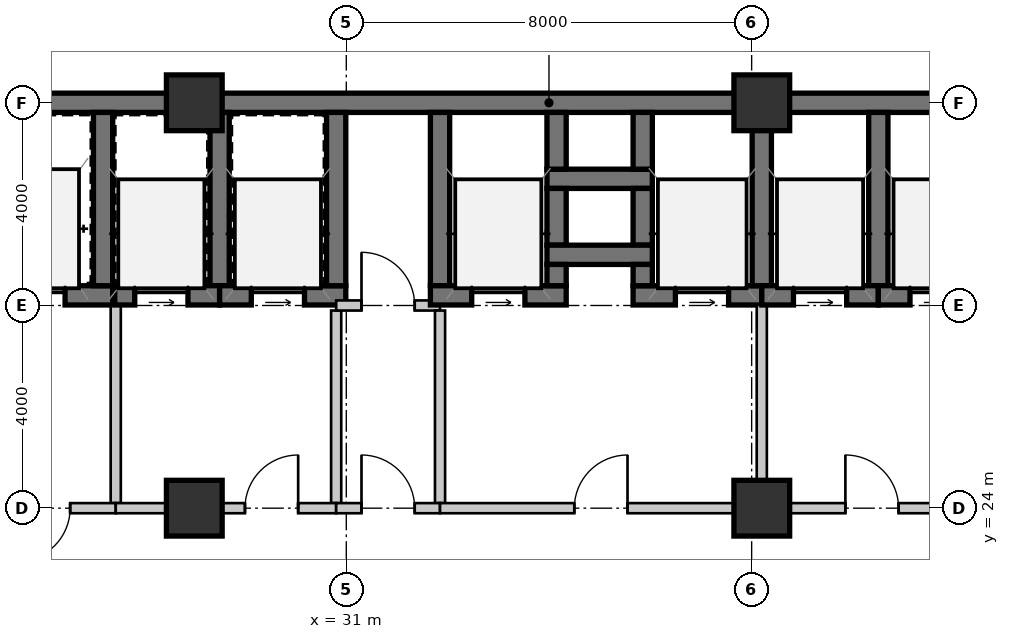
"""IFC4 building model, lengths in metres.
Left out: names, types, materials, properties, quantities, classifications, styles, units other than length and angle.
Written with IfcOpenShell. Run it as: python <this file> out.ifc"""

import sys

from ifc_helpers import new_model, si_unit, direction, frame, frame_2d, origin, origin_2d, place, context, subcontext, project, spatial, rectangle, extrude, source, transform, mapped, element, fill, save


model = new_model("IFC4")
c1 = context("Model", 3, precision=1e-05, world=origin(), true_north=direction((0.0, 1.0)))
c2 = subcontext(c1, "Body", "Model", "MODEL_VIEW")
j1 = project(units=[si_unit("LENGTHUNIT", "METRE"), si_unit("PLANEANGLEUNIT", "RADIAN")], contexts=[c1])
p1 = place(None, origin())
s1 = spatial("IfcSite", under=j1, at=p1, CompositionType="ELEMENT")
p2 = place(p1, origin())
s2 = spatial("IfcBuilding", under=s1, at=p2, CompositionType="ELEMENT")
p3 = place(p2, origin())
s3 = spatial("IfcBuildingStorey", under=s2, at=p3, CompositionType="ELEMENT", Elevation=0.0)
m1 = source(origin(), c2, "Body", "SweptSolid", [
    extrude(rectangle(XDim=1.1, YDim=1.1, at=origin_2d()), origin(), (0.0, 0.0, 1.0), 4.55),
])
for number, where, z_axis, x_axis in (
    (1, (28.0, 24.0, 0.0), (0.0, 0.0, 1.0), (1.0, 0.0, 0.0)),
    (2, (39.2, 24.0, 0.0), (0.0, 0.0, 1.0), (1.0, 0.0, 0.0)),
    (3, (28.0, 32.0, 0.0), (0.0, 0.0, 1.0), (1.0, 0.0, 0.0)),
    (4, (39.2, 32.0, 0.0), (0.0, 0.0, 1.0), (1.0, 0.0, 0.0)),
):
    element("IfcColumn", number, at=place(p3, frame(where, z_axis=z_axis, x_axis=x_axis)), inside=s3, PredefinedType="COLUMN", context=c2, shape_type="MappedRepresentation", body=[
        mapped(m1, transform((0.0, 0.0, 0.0), scale=1.0)),
    ])
m2 = source(origin(), c2, "Body", "SweptSolid", [
    extrude(rectangle(XDim=9.19, YDim=0.38, at=frame_2d((4.595, 0.0))), origin(), (0.0, 0.0, 1.0), 4.29),
])
p4 = place(p3, frame((18.81, 32.0, 0.0), z_axis=(0.0, 0.0, 1.0), x_axis=(1.0, 0.0, 0.0)))
e5 = element("IfcWall", 5, at=p4, inside=s3, PredefinedType="SHEAR", context=c2, shape_type="MappedRepresentation", body=[
    mapped(m2, transform((0.0, 0.0, 0.0), scale=1.0)),
])
m3 = source(origin(), c2, "Body", "SweptSolid", [
    extrude(rectangle(XDim=11.2, YDim=0.38, at=frame_2d((5.6, 0.0))), origin(), (0.0, 0.0, 1.0), 4.29),
])
p5 = place(p3, frame((28.0, 32.0, 0.0), z_axis=(0.0, 0.0, 1.0), x_axis=(1.0, 0.0, 0.0)))
e6 = element("IfcWall", 6, at=p5, inside=s3, PredefinedType="SHEAR", context=c2, shape_type="MappedRepresentation", body=[
    mapped(m3, transform((0.0, 0.0, 0.0), scale=1.0)),
])
m4 = source(origin(), c2, "Body", "SweptSolid", [
    extrude(rectangle(XDim=11.99, YDim=0.38, at=frame_2d((5.995, 0.0))), origin(), (0.0, 0.0, 1.0), 4.29),
])
p6 = place(p3, frame((39.2, 32.0, 0.0), z_axis=(0.0, 0.0, 1.0), x_axis=(1.0, 0.0, 0.0)))
e7 = element("IfcWall", 7, at=p6, inside=s3, PredefinedType="SHEAR", context=c2, shape_type="MappedRepresentation", body=[
    mapped(m4, transform((0.0, 0.0, 0.0), scale=1.0)),
])
m5 = source(origin(), c2, "Body", "SweptSolid", [
    extrude(rectangle(XDim=2.98, YDim=0.38, at=frame_2d((1.49, 0.0))), origin(), (0.0, 0.0, 1.0), 4.29),
])
p7 = place(p3, frame((23.41, 28.2, 0.0), z_axis=(0.0, 0.0, 1.0), x_axis=(1.0, 0.0, 0.0)))
e8 = element("IfcWall", 8, at=p7, inside=s3, PredefinedType="SHEAR", context=c2, shape_type="MappedRepresentation", body=[
    mapped(m5, transform((0.0, 0.0, 0.0), scale=1.0)),
])
m6 = source(origin(), c2, "Body", "SweptSolid", [
    extrude(rectangle(XDim=1.1, YDim=2.15, at=frame_2d((0.55, 1.075))), frame((0.0, 0.2, 0.0), z_axis=(0.0, -1.0, 0.0), x_axis=(1.0, 0.0, 0.0)), (0.0, 0.0, 1.0), 0.4),
])
p8 = place(p7, frame((0.94, 0.0, 0.0)))
e9 = element("IfcOpeningElement", 9, at=p8, cuts=e8, PredefinedType="OPENING", context=c2, shape_type="MappedRepresentation", body=[
    mapped(m6, transform((0.0, 0.0, 0.0), scale=1.0)),
])
m7 = source(origin(), c2, "Body", "SweptSolid", [
    extrude(rectangle(XDim=3.42, YDim=0.38, at=frame_2d((1.71, 0.0))), origin(), (0.0, 0.0, 1.0), 4.29),
])
p9 = place(p3, frame((26.2, 28.39, 0.0), z_axis=(0.0, 0.0, 1.0), x_axis=(0.0, 1.0, 0.0)))
e10 = element("IfcWall", 10, at=p9, inside=s3, PredefinedType="SHEAR", context=c2, shape_type="MappedRepresentation", body=[
    mapped(m7, transform((0.0, 0.0, 0.0), scale=1.0)),
])
m8 = source(origin(), c2, "Body", "SweptSolid", [
    extrude(rectangle(XDim=3.91, YDim=0.2, at=frame_2d((1.955, 0.0))), origin(), (0.0, 0.0, 1.0), 4.29),
])
p10 = place(p3, frame((26.45, 24.1, 0.0), z_axis=(0.0, 0.0, 1.0), x_axis=(0.0, 1.0, 0.0)))
e11 = element("IfcWall", 11, at=p10, inside=s3, PredefinedType="SOLIDWALL", context=c2, shape_type="MappedRepresentation", body=[
    mapped(m8, transform((0.0, 0.0, 0.0), scale=1.0)),
])
m9 = source(origin(), c2, "Body", "SweptSolid", [
    extrude(rectangle(XDim=2.66, YDim=0.2, at=frame_2d((1.33, 0.0))), origin(), (0.0, 0.0, 1.0), 3.83),
])
p11 = place(p3, frame((23.79, 24.0, 0.0), z_axis=(0.0, 0.0, 1.0), x_axis=(1.0, 0.0, 0.0)))
e12 = element("IfcWall", 12, at=p11, inside=s3, PredefinedType="SOLIDWALL", context=c2, shape_type="MappedRepresentation", body=[
    mapped(m9, transform((0.0, 0.0, 0.0), scale=1.0)),
])
m10 = source(origin(), c2, "Body", "SweptSolid", [
    extrude(rectangle(XDim=1.05, YDim=2.1, at=frame_2d((0.525, 1.05))), frame((0.0, 0.11, 0.0), z_axis=(0.0, -1.0, 0.0), x_axis=(1.0, 0.0, 0.0)), (0.0, 0.0, 1.0), 0.22),
])
p12 = place(p11, frame((0.71, 0.0, 0.0)))
e13 = element("IfcOpeningElement", 13, at=p12, cuts=e12, PredefinedType="OPENING", context=c2, shape_type="MappedRepresentation", body=[
    mapped(m10, transform((0.0, 0.0, 0.0), scale=1.0)),
])
m11 = source(origin(), c2, "Body", "SweptSolid", [
    extrude(rectangle(XDim=2.08, YDim=0.38, at=frame_2d((1.04, 0.0))), origin(), (0.0, 0.0, 1.0), 4.29),
])
p13 = place(p3, frame((34.96, 30.5, 0.0), z_axis=(0.0, 0.0, 1.0), x_axis=(1.0, 0.0, 0.0)))
e14 = element("IfcWall", 14, at=p13, inside=s3, PredefinedType="SHEAR", context=c2, shape_type="MappedRepresentation", body=[
    mapped(m11, transform((0.0, 0.0, 0.0), scale=1.0)),
])
m12 = source(origin(), c2, "Body", "SweptSolid", [
    extrude(rectangle(XDim=1.12, YDim=0.38, at=frame_2d((0.56, 0.0))), origin(), (0.0, 0.0, 1.0), 4.29),
])
for number, where, z_axis, x_axis in (
    (15, (35.15, 31.81, 0.0), (0.0, 0.0, 1.0), (0.0, -1.0, 0.0)),
    (16, (36.85, 30.69, 0.0), (0.0, 0.0, 1.0), (0.0, 1.0, 0.0)),
    (17, (35.15, 30.31, 0.0), (0.0, 0.0, 1.0), (0.0, -1.0, 0.0)),
    (18, (36.85, 29.19, 0.0), (0.0, 0.0, 1.0), (0.0, 1.0, 0.0)),
):
    element("IfcWall", number, at=place(p3, frame(where, z_axis=z_axis, x_axis=x_axis)), inside=s3, PredefinedType="SHEAR", context=c2, shape_type="MappedRepresentation", body=[
        mapped(m12, transform((0.0, 0.0, 0.0), scale=1.0)),
    ])
p14 = place(p3, frame((34.96, 29.0, 0.0), z_axis=(0.0, 0.0, 1.0), x_axis=(1.0, 0.0, 0.0)))
e19 = element("IfcWall", 19, at=p14, inside=s3, PredefinedType="SHEAR", context=c2, shape_type="MappedRepresentation", body=[
    mapped(m11, transform((0.0, 0.0, 0.0), scale=1.0)),
])
p15 = place(p3, frame((28.5, 28.39, 0.0), z_axis=(0.0, 0.0, 1.0), x_axis=(0.0, 1.0, 0.0)))
e20 = element("IfcWall", 20, at=p15, inside=s3, PredefinedType="SHEAR", context=c2, shape_type="MappedRepresentation", body=[
    mapped(m7, transform((0.0, 0.0, 0.0), scale=1.0)),
])
m13 = source(origin(), c2, "Body", "SweptSolid", [
    extrude(rectangle(XDim=2.07, YDim=0.38, at=frame_2d((1.035, 0.0))), origin(), (0.0, 0.0, 1.0), 4.29),
])
p16 = place(p3, frame((26.43, 28.2, 0.0), z_axis=(0.0, 0.0, 1.0), x_axis=(1.0, 0.0, 0.0)))
e21 = element("IfcWall", 21, at=p16, inside=s3, PredefinedType="SHEAR", context=c2, shape_type="MappedRepresentation", body=[
    mapped(m13, transform((0.0, 0.0, 0.0), scale=1.0)),
])
m14 = source(origin(), c2, "Body", "SweptSolid", [
    extrude(rectangle(XDim=1.05, YDim=2.15, at=frame_2d((0.525, 1.075))), frame((0.0, 0.2, 0.0), z_axis=(0.0, -1.0, 0.0), x_axis=(1.0, 0.0, 0.0)), (0.0, 0.0, 1.0), 0.4),
])
p17 = place(p16, frame((0.395, 0.0, 0.0)))
e22 = element("IfcOpeningElement", 22, at=p17, cuts=e21, PredefinedType="OPENING", context=c2, shape_type="MappedRepresentation", body=[
    mapped(m14, transform((0.0, 0.0, 0.0), scale=1.0)),
])
m15 = source(origin(), c2, "Body", "SweptSolid", [
    extrude(rectangle(XDim=2.49, YDim=0.38, at=frame_2d((1.245, 0.0))), origin(), (0.0, 0.0, 1.0), 4.29),
])
p18 = place(p3, frame((28.5, 28.2, 0.0), z_axis=(0.0, 0.0, 1.0), x_axis=(1.0, 0.0, 0.0)))
e23 = element("IfcWall", 23, at=p18, inside=s3, PredefinedType="SHEAR", context=c2, shape_type="MappedRepresentation", body=[
    mapped(m15, transform((0.0, 0.0, 0.0), scale=1.0)),
])
p19 = place(p18, frame((0.625, 0.0, 0.0)))
e24 = element("IfcOpeningElement", 24, at=p19, cuts=e23, PredefinedType="OPENING", context=c2, shape_type="MappedRepresentation", body=[
    mapped(m14, transform((0.0, 0.0, 0.0), scale=1.0)),
])
p20 = place(p3, frame((30.8, 28.39, 0.0), z_axis=(0.0, 0.0, 1.0), x_axis=(0.0, 1.0, 0.0)))
e25 = element("IfcWall", 25, at=p20, inside=s3, PredefinedType="SHEAR", context=c2, shape_type="MappedRepresentation", body=[
    mapped(m7, transform((0.0, 0.0, 0.0), scale=1.0)),
])
m16 = source(origin(), c2, "Body", "SweptSolid", [
    extrude(rectangle(XDim=3.8, YDim=0.2, at=frame_2d((1.9, 0.0))), origin(), (0.0, 0.0, 1.0), 4.29),
])
p21 = place(p3, frame((30.8, 27.9, 0.0), z_axis=(0.0, 0.0, 1.0), x_axis=(0.0, -1.0, 0.0)))
e26 = element("IfcWall", 26, at=p21, inside=s3, PredefinedType="SOLIDWALL", context=c2, shape_type="MappedRepresentation", body=[
    mapped(m16, transform((0.0, 0.0, 0.0), scale=1.0)),
])
m17 = source(origin(), c2, "Body", "SweptSolid", [
    extrude(rectangle(XDim=4.35, YDim=0.2, at=frame_2d((2.175, 0.0))), origin(), (0.0, 0.0, 1.0), 3.83),
])
p22 = place(p3, frame((30.8, 24.0, 0.0), z_axis=(0.0, 0.0, 1.0), x_axis=(-1.0, 0.0, 0.0)))
e27 = element("IfcWall", 27, at=p22, inside=s3, PredefinedType="SOLIDWALL", context=c2, shape_type="MappedRepresentation", body=[
    mapped(m17, transform((0.0, 0.0, 0.0), scale=1.0)),
])
p23 = place(p22, frame((0.75, 0.0, 0.0)))
e28 = element("IfcOpeningElement", 28, at=p23, cuts=e27, PredefinedType="OPENING", context=c2, shape_type="MappedRepresentation", body=[
    mapped(m10, transform((0.0, 0.0, 0.0), scale=1.0)),
])
m18 = source(origin(), c2, "Body", "SweptSolid", [
    extrude(rectangle(XDim=2.05, YDim=0.2, at=frame_2d((1.025, 0.0))), origin(), (0.0, 0.0, 1.0), 4.29),
])
p24 = place(p3, frame((30.8, 28.0, 0.0), z_axis=(0.0, 0.0, 1.0), x_axis=(1.0, 0.0, 0.0)))
e29 = element("IfcWall", 29, at=p24, inside=s3, PredefinedType="SOLIDWALL", context=c2, shape_type="MappedRepresentation", body=[
    mapped(m18, transform((0.0, 0.0, 0.0), scale=1.0)),
])
p25 = place(p24, frame((0.5, 0.0, 0.0)))
e30 = element("IfcOpeningElement", 30, at=p25, cuts=e29, PredefinedType="OPENING", context=c2, shape_type="MappedRepresentation", body=[
    mapped(m10, transform((0.0, 0.0, 0.0), scale=1.0)),
])
p26 = place(p3, frame((32.85, 27.9, 0.0), z_axis=(0.0, 0.0, 1.0), x_axis=(0.0, -1.0, 0.0)))
e31 = element("IfcWall", 31, at=p26, inside=s3, PredefinedType="SOLIDWALL", context=c2, shape_type="MappedRepresentation", body=[
    mapped(m16, transform((0.0, 0.0, 0.0), scale=1.0)),
])
m19 = source(origin(), c2, "Body", "SweptSolid", [
    extrude(rectangle(XDim=2.05, YDim=0.2, at=frame_2d((1.025, 0.0))), origin(), (0.0, 0.0, 1.0), 3.83),
])
p27 = place(p3, frame((32.85, 24.0, 0.0), z_axis=(0.0, 0.0, 1.0), x_axis=(-1.0, 0.0, 0.0)))
e32 = element("IfcWall", 32, at=p27, inside=s3, PredefinedType="SOLIDWALL", context=c2, shape_type="MappedRepresentation", body=[
    mapped(m19, transform((0.0, 0.0, 0.0), scale=1.0)),
])
p28 = place(p27, frame((0.5, 0.0, 0.0)))
e33 = element("IfcOpeningElement", 33, at=p28, cuts=e32, PredefinedType="OPENING", context=c2, shape_type="MappedRepresentation", body=[
    mapped(m10, transform((0.0, 0.0, 0.0), scale=1.0)),
])
p29 = place(p3, frame((32.85, 31.81, 0.0), z_axis=(0.0, 0.0, 1.0), x_axis=(0.0, -1.0, 0.0)))
e34 = element("IfcWall", 34, at=p29, inside=s3, PredefinedType="SHEAR", context=c2, shape_type="MappedRepresentation", body=[
    mapped(m7, transform((0.0, 0.0, 0.0), scale=1.0)),
])
m20 = source(origin(), c2, "Body", "SweptSolid", [
    extrude(rectangle(XDim=2.68, YDim=0.38, at=frame_2d((1.34, 0.0))), origin(), (0.0, 0.0, 1.0), 4.29),
])
p30 = place(p3, frame((32.66, 28.2, 0.0), z_axis=(0.0, 0.0, 1.0), x_axis=(1.0, 0.0, 0.0)))
e35 = element("IfcWall", 35, at=p30, inside=s3, PredefinedType="SHEAR", context=c2, shape_type="MappedRepresentation", body=[
    mapped(m20, transform((0.0, 0.0, 0.0), scale=1.0)),
])
p31 = place(p30, frame((0.815, 0.0, 0.0)))
e36 = element("IfcOpeningElement", 36, at=p31, cuts=e35, PredefinedType="OPENING", context=c2, shape_type="MappedRepresentation", body=[
    mapped(m14, transform((0.0, 0.0, 0.0), scale=1.0)),
])
m21 = source(origin(), c2, "Body", "SweptSolid", [
    extrude(rectangle(XDim=0.42, YDim=0.38, at=frame_2d((0.21, 0.0))), origin(), (0.0, 0.0, 1.0), 4.29),
])
p32 = place(p3, frame((35.15, 28.39, 0.0), z_axis=(0.0, 0.0, 1.0), x_axis=(0.0, 1.0, 0.0)))
e37 = element("IfcWall", 37, at=p32, inside=s3, PredefinedType="SHEAR", context=c2, shape_type="MappedRepresentation", body=[
    mapped(m21, transform((0.0, 0.0, 0.0), scale=1.0)),
])
m22 = source(origin(), c2, "Body", "SweptSolid", [
    extrude(rectangle(XDim=2.54, YDim=0.38, at=frame_2d((1.27, 0.0))), origin(), (0.0, 0.0, 1.0), 4.29),
])
p33 = place(p3, frame((36.66, 28.2, 0.0), z_axis=(0.0, 0.0, 1.0), x_axis=(1.0, 0.0, 0.0)))
e38 = element("IfcWall", 38, at=p33, inside=s3, PredefinedType="SHEAR", context=c2, shape_type="MappedRepresentation", body=[
    mapped(m22, transform((0.0, 0.0, 0.0), scale=1.0)),
])
p34 = place(p33, frame((0.835, 0.0, 0.0)))
e39 = element("IfcOpeningElement", 39, at=p34, cuts=e38, PredefinedType="OPENING", context=c2, shape_type="MappedRepresentation", body=[
    mapped(m14, transform((0.0, 0.0, 0.0), scale=1.0)),
])
p35 = place(p3, frame((36.85, 28.81, 0.0), z_axis=(0.0, 0.0, 1.0), x_axis=(0.0, -1.0, 0.0)))
e40 = element("IfcWall", 40, at=p35, inside=s3, PredefinedType="SHEAR", context=c2, shape_type="MappedRepresentation", body=[
    mapped(m21, transform((0.0, 0.0, 0.0), scale=1.0)),
])
p36 = place(p3, frame((39.2, 28.39, 0.0), z_axis=(0.0, 0.0, 1.0), x_axis=(0.0, 1.0, 0.0)))
e41 = element("IfcWall", 41, at=p36, inside=s3, PredefinedType="SHEAR", context=c2, shape_type="MappedRepresentation", body=[
    mapped(m7, transform((0.0, 0.0, 0.0), scale=1.0)),
])
m23 = source(origin(), c2, "Body", "SweptSolid", [
    extrude(rectangle(XDim=3.91, YDim=0.2, at=frame_2d((1.955, 0.0))), origin(), (0.0, 0.0, 1.0), 3.83),
])
p37 = place(p3, frame((39.2, 28.01, 0.0), z_axis=(0.0, 0.0, 1.0), x_axis=(0.0, -1.0, 0.0)))
e42 = element("IfcWall", 42, at=p37, inside=s3, PredefinedType="SOLIDWALL", context=c2, shape_type="MappedRepresentation", body=[
    mapped(m23, transform((0.0, 0.0, 0.0), scale=1.0)),
])
m24 = source(origin(), c2, "Body", "SweptSolid", [
    extrude(rectangle(XDim=6.35, YDim=0.2, at=frame_2d((3.175, 0.0))), origin(), (0.0, 0.0, 1.0), 3.83),
])
p38 = place(p3, frame((39.2, 24.0, 0.0), z_axis=(0.0, 0.0, 1.0), x_axis=(-1.0, 0.0, 0.0)))
e43 = element("IfcWall", 43, at=p38, inside=s3, PredefinedType="SOLIDWALL", context=c2, shape_type="MappedRepresentation", body=[
    mapped(m24, transform((0.0, 0.0, 0.0), scale=1.0)),
])
p39 = place(p38, frame((2.65, 0.0, 0.0)))
e44 = element("IfcOpeningElement", 44, at=p39, cuts=e43, PredefinedType="OPENING", context=c2, shape_type="MappedRepresentation", body=[
    mapped(m10, transform((0.0, 0.0, 0.0), scale=1.0)),
])
p40 = place(p3, frame((41.5, 28.39, 0.0), z_axis=(0.0, 0.0, 1.0), x_axis=(0.0, 1.0, 0.0)))
e45 = element("IfcWall", 45, at=p40, inside=s3, PredefinedType="SHEAR", context=c2, shape_type="MappedRepresentation", body=[
    mapped(m7, transform((0.0, 0.0, 0.0), scale=1.0)),
])
m25 = source(origin(), c2, "Body", "SweptSolid", [
    extrude(rectangle(XDim=2.3, YDim=0.38, at=frame_2d((1.15, 0.0))), origin(), (0.0, 0.0, 1.0), 4.29),
])
p41 = place(p3, frame((39.2, 28.2, 0.0), z_axis=(0.0, 0.0, 1.0), x_axis=(1.0, 0.0, 0.0)))
e46 = element("IfcWall", 46, at=p41, inside=s3, PredefinedType="SHEAR", context=c2, shape_type="MappedRepresentation", body=[
    mapped(m25, transform((0.0, 0.0, 0.0), scale=1.0)),
])
p42 = place(p41, frame((0.625, 0.0, 0.0)))
e47 = element("IfcOpeningElement", 47, at=p42, cuts=e46, PredefinedType="OPENING", context=c2, shape_type="MappedRepresentation", body=[
    mapped(m14, transform((0.0, 0.0, 0.0), scale=1.0)),
])
p43 = place(p3, frame((41.5, 28.2, 0.0), z_axis=(0.0, 0.0, 1.0), x_axis=(1.0, 0.0, 0.0)))
e48 = element("IfcWall", 48, at=p43, inside=s3, PredefinedType="SHEAR", context=c2, shape_type="MappedRepresentation", body=[
    mapped(m13, transform((0.0, 0.0, 0.0), scale=1.0)),
])
p44 = place(p43, frame((0.625, 0.0, 0.0)))
e49 = element("IfcOpeningElement", 49, at=p44, cuts=e48, PredefinedType="OPENING", context=c2, shape_type="MappedRepresentation", body=[
    mapped(m14, transform((0.0, 0.0, 0.0), scale=1.0)),
])
m26 = source(origin(), c2, "Body", "SweptSolid", [
    extrude(rectangle(XDim=4.35, YDim=0.2, at=frame_2d((2.175, 0.0))), origin(), (0.0, 0.0, 1.0), 3.757),
])
p45 = place(p3, frame((43.55, 24.0, 0.0), z_axis=(0.0, 0.0, 1.0), x_axis=(-1.0, 0.0, 0.0)))
e50 = element("IfcWall", 50, at=p45, inside=s3, PredefinedType="SOLIDWALL", context=c2, shape_type="MappedRepresentation", body=[
    mapped(m26, transform((0.0, 0.0, 0.0), scale=1.0)),
])
p46 = place(p45, frame((1.65, 0.0, 0.0)))
e51 = element("IfcOpeningElement", 51, at=p46, cuts=e50, PredefinedType="OPENING", context=c2, shape_type="MappedRepresentation", body=[
    mapped(m10, transform((0.0, 0.0, 0.0), scale=1.0)),
])
m27 = source(origin(), c2, "Body", "SweptSolid", [
    extrude(rectangle(XDim=1.1, YDim=2.15, at=frame_2d((0.55, 1.075))), frame((0.0, 0.025, 0.0), z_axis=(0.0, -1.0, 0.0), x_axis=(1.0, 0.0, 0.0)), (0.0, 0.0, 1.0), 0.05),
])
p47 = place(p8, origin())
e52 = element("IfcDoor", 52, at=p47, inside=s3, OperationType="SLIDING_TO_LEFT", PredefinedType="DOOR", context=c2, shape_type="MappedRepresentation", body=[
    mapped(m27, transform((0.0, 0.0, 0.0), scale=1.0)),
])
fill(e9, e52)
m28 = source(origin(), c2, "Body", "SweptSolid", [
    extrude(rectangle(XDim=1.05, YDim=2.1, at=frame_2d((0.525, 1.05))), frame((0.0, 0.025, 0.0), z_axis=(0.0, -1.0, 0.0), x_axis=(1.0, 0.0, 0.0)), (0.0, 0.0, 1.0), 0.05),
])
p48 = place(p12, frame((1.05, 0.0, 0.0), z_axis=(0.0, 0.0, 1.0), x_axis=(-1.0, 0.0, 0.0)))
e53 = element("IfcDoor", 53, at=p48, inside=s3, OperationType="SINGLE_SWING_RIGHT", PredefinedType="DOOR", context=c2, shape_type="MappedRepresentation", body=[
    mapped(m28, transform((0.0, 0.0, 0.0), scale=1.0)),
])
fill(e13, e53)
m29 = source(origin(), c2, "Body", "SweptSolid", [
    extrude(rectangle(XDim=1.05, YDim=2.15, at=frame_2d((0.525, 1.075))), frame((0.0, 0.025, 0.0), z_axis=(0.0, -1.0, 0.0), x_axis=(1.0, 0.0, 0.0)), (0.0, 0.0, 1.0), 0.05),
])
p49 = place(p17, origin())
e54 = element("IfcDoor", 54, at=p49, inside=s3, OperationType="SLIDING_TO_LEFT", PredefinedType="DOOR", context=c2, shape_type="MappedRepresentation", body=[
    mapped(m29, transform((0.0, 0.0, 0.0), scale=1.0)),
])
fill(e22, e54)
p50 = place(p19, origin())
e55 = element("IfcDoor", 55, at=p50, inside=s3, OperationType="SLIDING_TO_LEFT", PredefinedType="DOOR", context=c2, shape_type="MappedRepresentation", body=[
    mapped(m29, transform((0.0, 0.0, 0.0), scale=1.0)),
])
fill(e24, e55)
p51 = place(p23, frame((1.05, 0.0, 0.0), z_axis=(0.0, 0.0, 1.0), x_axis=(-1.0, 0.0, 0.0)))
e56 = element("IfcDoor", 56, at=p51, inside=s3, OperationType="SINGLE_SWING_RIGHT", PredefinedType="DOOR", context=c2, shape_type="MappedRepresentation", body=[
    mapped(m28, transform((0.0, 0.0, 0.0), scale=1.0)),
])
fill(e28, e56)
p52 = place(p25, origin())
e57 = element("IfcDoor", 57, at=p52, inside=s3, OperationType="SINGLE_SWING_LEFT", PredefinedType="DOOR", context=c2, shape_type="MappedRepresentation", body=[
    mapped(m28, transform((0.0, 0.0, 0.0), scale=1.0)),
])
fill(e30, e57)
p53 = place(p28, frame((1.05, 0.0, 0.0), z_axis=(0.0, 0.0, 1.0), x_axis=(-1.0, 0.0, 0.0)))
e58 = element("IfcDoor", 58, at=p53, inside=s3, OperationType="SINGLE_SWING_LEFT", PredefinedType="DOOR", context=c2, shape_type="MappedRepresentation", body=[
    mapped(m28, transform((0.0, 0.0, 0.0), scale=1.0)),
])
fill(e33, e58)
p54 = place(p31, origin())
e59 = element("IfcDoor", 59, at=p54, inside=s3, OperationType="SLIDING_TO_LEFT", PredefinedType="DOOR", context=c2, shape_type="MappedRepresentation", body=[
    mapped(m29, transform((0.0, 0.0, 0.0), scale=1.0)),
])
fill(e36, e59)
p55 = place(p34, origin())
e60 = element("IfcDoor", 60, at=p55, inside=s3, OperationType="SLIDING_TO_LEFT", PredefinedType="DOOR", context=c2, shape_type="MappedRepresentation", body=[
    mapped(m29, transform((0.0, 0.0, 0.0), scale=1.0)),
])
fill(e39, e60)
p56 = place(p39, frame((1.05, 0.0, 0.0), z_axis=(0.0, 0.0, 1.0), x_axis=(-1.0, 0.0, 0.0)))
e61 = element("IfcDoor", 61, at=p56, inside=s3, OperationType="SINGLE_SWING_RIGHT", PredefinedType="DOOR", context=c2, shape_type="MappedRepresentation", body=[
    mapped(m28, transform((0.0, 0.0, 0.0), scale=1.0)),
])
fill(e44, e61)
p57 = place(p42, origin())
e62 = element("IfcDoor", 62, at=p57, inside=s3, OperationType="SLIDING_TO_LEFT", PredefinedType="DOOR", context=c2, shape_type="MappedRepresentation", body=[
    mapped(m29, transform((0.0, 0.0, 0.0), scale=1.0)),
])
fill(e47, e62)
p58 = place(p44, origin())
e63 = element("IfcDoor", 63, at=p58, inside=s3, OperationType="SLIDING_TO_LEFT", PredefinedType="DOOR", context=c2, shape_type="MappedRepresentation", body=[
    mapped(m29, transform((0.0, 0.0, 0.0), scale=1.0)),
])
fill(e49, e63)
p59 = place(p46, frame((1.05, 0.0, 0.0), z_axis=(0.0, 0.0, 1.0), x_axis=(-1.0, 0.0, 0.0)))
e64 = element("IfcDoor", 64, at=p59, inside=s3, OperationType="SINGLE_SWING_LEFT", PredefinedType="DOOR", context=c2, shape_type="MappedRepresentation", body=[
    mapped(m28, transform((0.0, 0.0, 0.0), scale=1.0)),
])
fill(e51, e64)
save(model, sys.argv[1])
